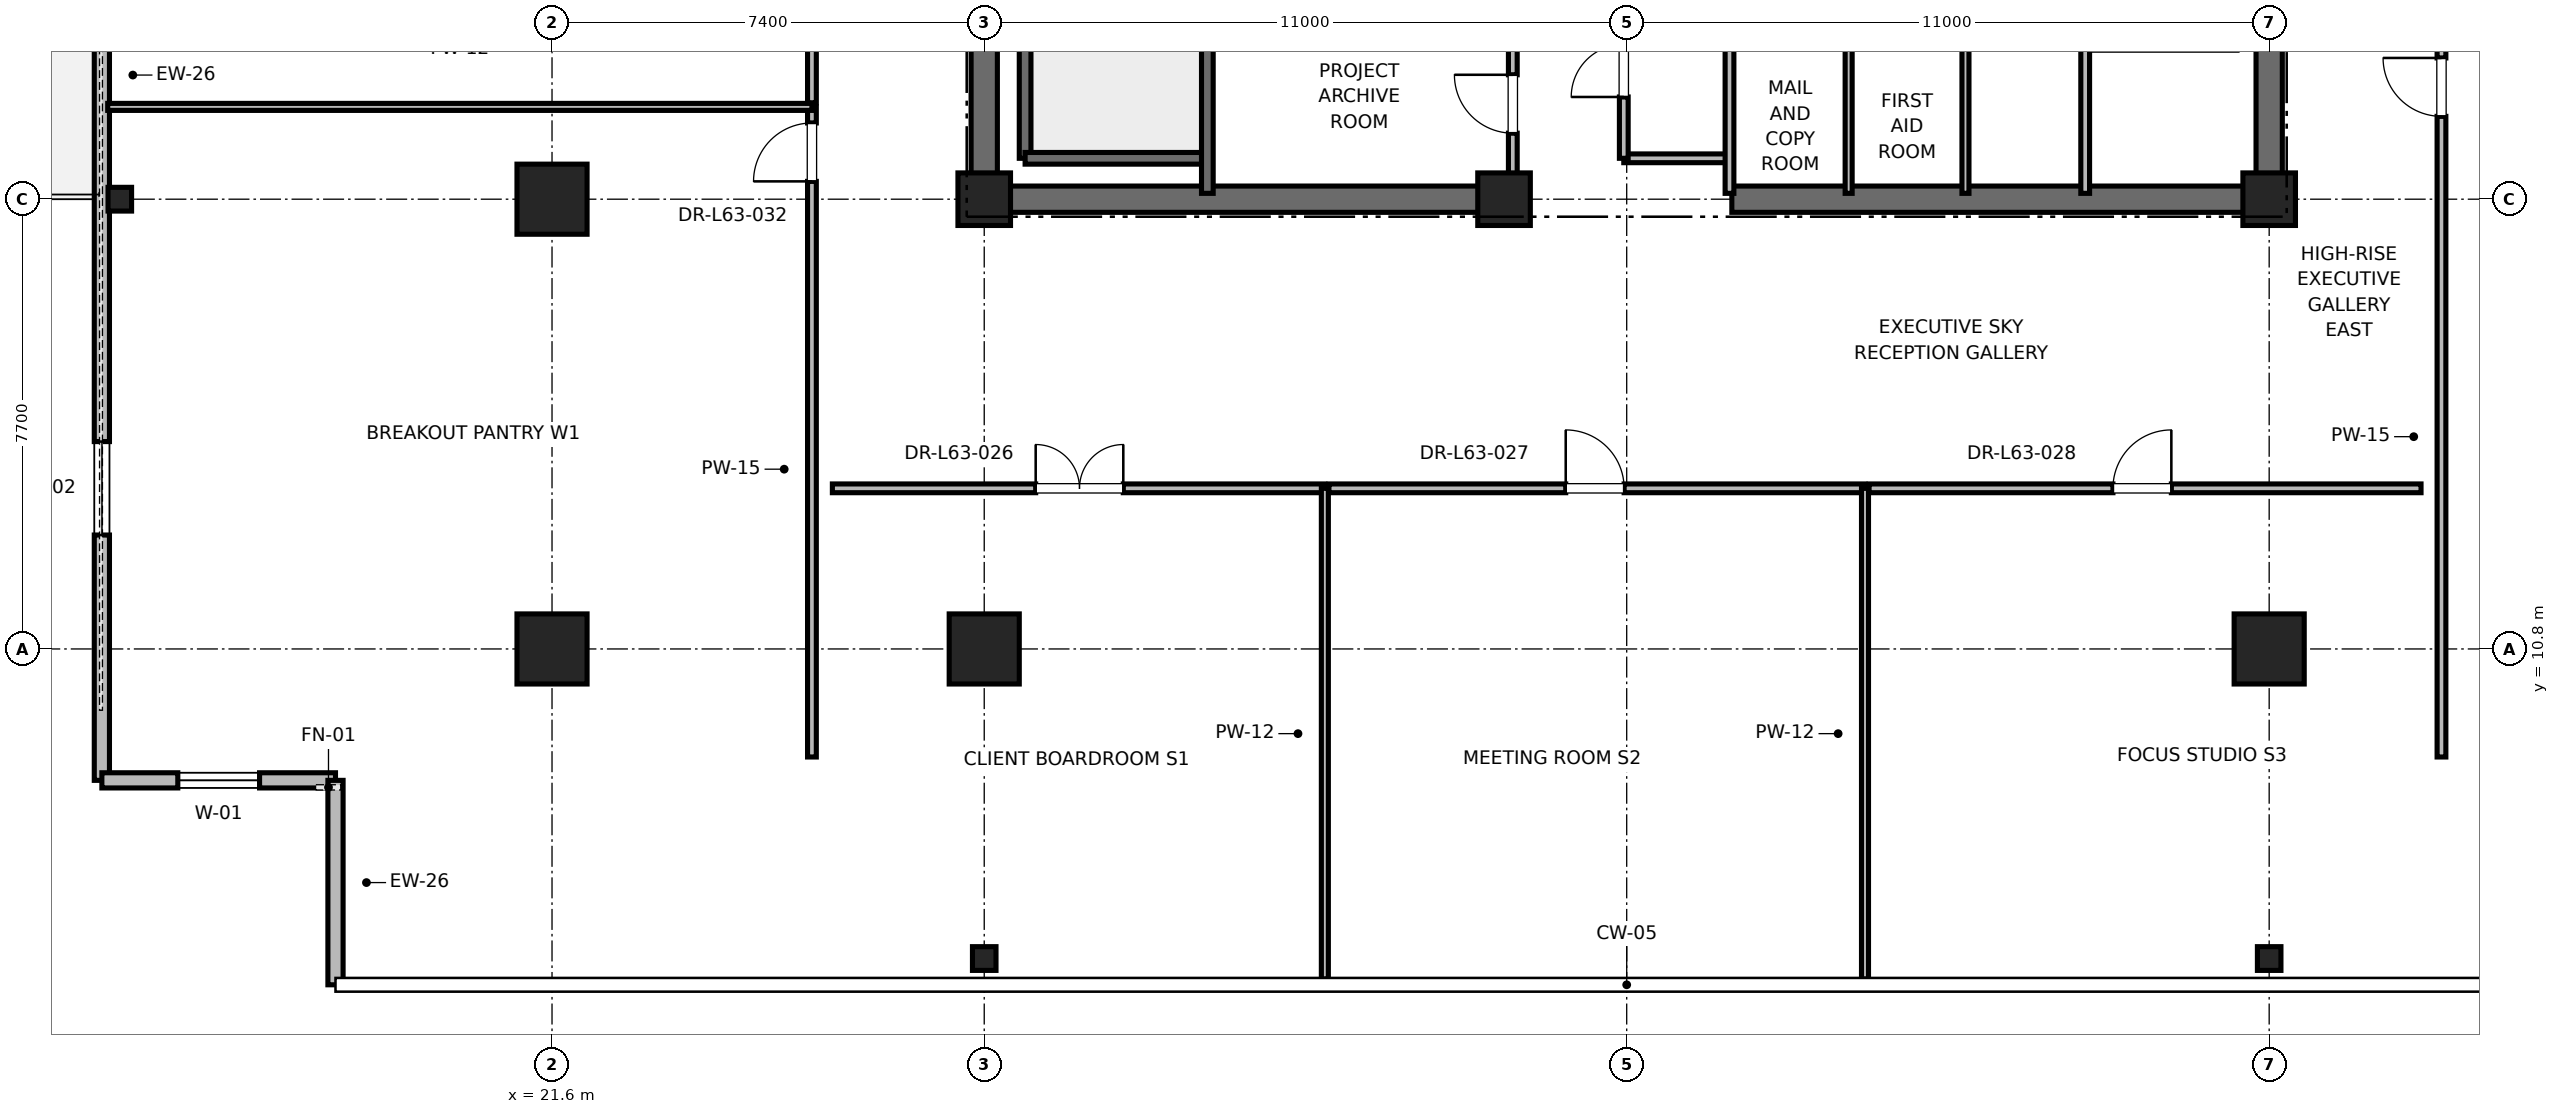
"""IFC4 building model, lengths in metres.
Left out: names, types, materials, properties, quantities, classifications, styles, units other than length and angle.
Written with IfcOpenShell. Run it as: python <this file> out.ifc"""

import sys

from ifc_helpers import new_model, si_unit, direction, frame, frame_2d, origin, origin_2d, place, context, subcontext, project, spatial, rectangle, i_section, extrude, element, fill, save


model = new_model("IFC4")
c1 = context("Model", 3, precision=1e-05, world=origin(), true_north=direction((0.0, 1.0)))
c2 = subcontext(c1, "Body", "Model", "MODEL_VIEW")
j1 = project(units=[si_unit("LENGTHUNIT", "METRE"), si_unit("PLANEANGLEUNIT", "RADIAN")], contexts=[c1])
p1 = place(None, origin())
s1 = spatial("IfcSite", under=j1, at=p1, CompositionType="ELEMENT")
p2 = place(p1, origin())
s2 = spatial("IfcBuilding", under=s1, at=p2, CompositionType="ELEMENT")
p3 = place(p2, frame((0.0, 0.0, 271.2)))
s3 = spatial("IfcBuildingStorey", under=s2, at=p3, CompositionType="ELEMENT", Elevation=271.2)
for number, where, z_axis, x_axis in (
    (1, (29.0, 10.8, 0.0), (0.0, 0.0, 1.0), (1.0, 0.0, 0.0)),
    (2, (51.0, 10.8, 0.0), (0.0, 0.0, 1.0), (1.0, 0.0, 0.0)),
    (3, (21.6, 18.5, 0.0), (0.0, 0.0, 1.0), (1.0, 0.0, 0.0)),
    (4, (21.6, 10.8, 0.0), (0.0, 0.0, 1.0), (1.0, 0.0, 0.0)),
):
    element("IfcColumn", number, at=place(p3, frame(where, z_axis=z_axis, x_axis=x_axis)), inside=s3, PredefinedType="COLUMN", context=c2, shape_type="SweptSolid", body=[
        extrude(rectangle(XDim=1.2, YDim=1.2, at=origin_2d()), origin(), (0.0, 0.0, 1.0), 4.0),
    ])
for number, where, z_axis, x_axis in (
    (5, (14.2, 18.5, 0.0), (0.0, 0.0, 1.0), (1.0, 0.0, 0.0)),
    (6, (29.0, 5.5, 0.0), (0.0, 0.0, 1.0), (1.0, 0.0, 0.0)),
    (7, (51.0, 5.5, 0.0), (0.0, 0.0, 1.0), (1.0, 0.0, 0.0)),
):
    element("IfcColumn", number, at=place(p3, frame(where, z_axis=z_axis, x_axis=x_axis)), inside=s3, PredefinedType="COLUMN", context=c2, shape_type="SweptSolid", body=[
        extrude(i_section(OverallWidth=0.403, OverallDepth=0.406, WebThickness=0.027, FlangeThickness=0.043, FilletRadius=0.015, at=origin_2d()), origin(), (0.0, 0.0, 1.0), 4.0),
    ])
for number, where, z_axis, x_axis in (
    (8, (29.0, 18.5, 0.0), (0.0, 0.0, 1.0), (1.0, 0.0, 0.0)),
    (9, (51.0, 18.5, 0.0), (0.0, 0.0, 1.0), (1.0, 0.0, 0.0)),
    (10, (37.9, 18.5, 0.0), (0.0, 0.0, 1.0), (1.0, 0.0, 0.0)),
):
    element("IfcColumn", number, at=place(p3, frame(where, z_axis=z_axis, x_axis=x_axis)), inside=s3, PredefinedType="PILASTER", context=c2, shape_type="SweptSolid", body=[
        extrude(rectangle(XDim=0.9, YDim=0.9, at=origin_2d()), origin(), (0.0, 0.0, 1.0), 4.0),
    ])
for number, where, z_axis, x_axis in (
    (11, (29.0, 18.5, 0.0), (0.0, 0.0, 1.0), (1.0, 0.0, 0.0)),
    (12, (41.8, 18.5, 0.0), (0.0, 0.0, 1.0), (1.0, 0.0, 0.0)),
):
    element("IfcWall", number, at=place(p3, frame(where, z_axis=z_axis, x_axis=x_axis)), inside=s3, PredefinedType="SHEAR", context=c2, shape_type="SweptSolid", body=[
        extrude(rectangle(XDim=9.2, YDim=0.45, at=frame_2d((4.6, 0.0))), origin(), (0.0, 0.0, 1.0), 3.785),
    ])
p4 = place(p3, frame((29.0, 18.5, 0.0), z_axis=(0.0, 0.0, 1.0), x_axis=(0.0, 1.0, 0.0)))
e13 = element("IfcWall", 13, at=p4, inside=s3, PredefinedType="SHEAR", context=c2, shape_type="SweptSolid", body=[
    extrude(rectangle(XDim=8.8, YDim=0.45, at=frame_2d((4.4, 0.0))), origin(), (0.0, 0.0, 1.0), 3.785),
])
p5 = place(p3, frame((51.0, 18.5, 0.0), z_axis=(0.0, 0.0, 1.0), x_axis=(0.0, 1.0, 0.0)))
e14 = element("IfcWall", 14, at=p5, inside=s3, PredefinedType="SHEAR", context=c2, shape_type="SweptSolid", body=[
    extrude(rectangle(XDim=5.8, YDim=0.45, at=frame_2d((2.9, 0.0))), origin(), (0.0, 0.0, 1.0), 3.785),
])
p6 = place(p3, frame((13.893, 46.45, 0.0), z_axis=(0.0, 0.0, 1.0), x_axis=(0.0, -1.0, 0.0)))
e15 = element("IfcWall", 15, at=p6, inside=s3, PredefinedType="PARAPET", context=c2, shape_type="SweptSolid", body=[
    extrude(rectangle(XDim=37.899, YDim=0.26, at=frame_2d((18.95, 0.0))), origin(), (0.0, 0.0, 1.0), 3.123),
])
p7 = place(p6, frame((4.2, 0.0, 0.85)))
e16 = element("IfcOpeningElement", 16, at=p7, cuts=e15, PredefinedType="OPENING", context=c2, shape_type="SweptSolid", body=[
    extrude(rectangle(XDim=1.6, YDim=2.1, at=frame_2d((0.8, 1.05))), frame((0.0, 0.13, 0.0), z_axis=(0.0, -1.0, 0.0), x_axis=(1.0, 0.0, 0.0)), (0.0, 0.0, 1.0), 0.26),
])
p8 = place(p6, frame((18.35, 0.0, 0.0)))
e17 = element("IfcOpeningElement", 17, at=p8, cuts=e15, PredefinedType="OPENING", context=c2, shape_type="SweptSolid", body=[
    extrude(rectangle(XDim=1.2, YDim=2.2, at=frame_2d((0.6, 1.1))), frame((0.0, 0.13, 0.0), z_axis=(0.0, -1.0, 0.0), x_axis=(1.0, 0.0, 0.0)), (0.0, 0.0, 1.0), 0.26),
])
p9 = place(p6, frame((32.099, 0.0, 0.85)))
e18 = element("IfcOpeningElement", 18, at=p9, cuts=e15, PredefinedType="OPENING", context=c2, shape_type="SweptSolid", body=[
    extrude(rectangle(XDim=1.6, YDim=2.1, at=frame_2d((0.8, 1.05))), frame((0.0, 0.13, 0.0), z_axis=(0.0, -1.0, 0.0), x_axis=(1.0, 0.0, 0.0)), (0.0, 0.0, 1.0), 0.26),
])
p10 = place(p3, frame((13.893, 8.55, 0.0), z_axis=(0.0, 0.0, 1.0), x_axis=(1.0, 0.0, 0.0)))
e19 = element("IfcWall", 19, at=p10, inside=s3, PredefinedType="PARAPET", context=c2, shape_type="SweptSolid", body=[
    extrude(rectangle(XDim=4.0, YDim=0.26, at=frame_2d((2.0, 0.0))), origin(), (0.0, 0.0, 1.0), 3.785),
])
p11 = place(p10, frame((1.3, 0.0, 0.85)))
e20 = element("IfcOpeningElement", 20, at=p11, cuts=e19, PredefinedType="OPENING", context=c2, shape_type="SweptSolid", body=[
    extrude(rectangle(XDim=1.4, YDim=2.0, at=frame_2d((0.7, 1.0))), frame((0.0, 0.13, 0.0), z_axis=(0.0, -1.0, 0.0), x_axis=(1.0, 0.0, 0.0)), (0.0, 0.0, 1.0), 0.26),
])
p12 = place(p3, frame((17.893, 8.55, 0.0), z_axis=(0.0, 0.0, 1.0), x_axis=(0.0, -1.0, 0.0)))
e21 = element("IfcWall", 21, at=p12, inside=s3, PredefinedType="PARAPET", context=c2, shape_type="SweptSolid", body=[
    extrude(rectangle(XDim=3.5, YDim=0.26, at=frame_2d((1.75, 0.0))), origin(), (0.0, 0.0, 1.0), 3.785),
])
p13 = place(p3, frame((29.7, 19.2, 0.0), z_axis=(0.0, 0.0, 1.0), x_axis=(0.0, 1.0, 0.0)))
e22 = element("IfcWall", 22, at=p13, inside=s3, PredefinedType="SOLIDWALL", context=c2, shape_type="SweptSolid", body=[
    extrude(rectangle(XDim=8.15, YDim=0.2, at=frame_2d((4.075, 0.0))), origin(), (0.0, 0.0, 1.0), 3.785),
])
p14 = place(p3, frame((29.7, 19.2, 0.0), z_axis=(0.0, 0.0, 1.0), x_axis=(1.0, 0.0, 0.0)))
e23 = element("IfcWall", 23, at=p14, inside=s3, PredefinedType="SOLIDWALL", context=c2, shape_type="SweptSolid", body=[
    extrude(rectangle(XDim=3.12, YDim=0.2, at=frame_2d((1.56, 0.0))), origin(), (0.0, 0.0, 1.0), 3.785),
])
p15 = place(p3, frame((32.82, 18.6, 0.0), z_axis=(0.0, 0.0, 1.0), x_axis=(0.0, 1.0, 0.0)))
e24 = element("IfcWall", 24, at=p15, inside=s3, PredefinedType="SOLIDWALL", context=c2, shape_type="SweptSolid", body=[
    extrude(rectangle(XDim=8.78, YDim=0.2, at=frame_2d((4.39, 0.0))), origin(), (0.0, 0.0, 1.0), 3.785),
])
p16 = place(p3, frame((39.95, 19.2, 0.0), z_axis=(0.0, 0.0, 1.0), x_axis=(1.0, 0.0, 0.0)))
e25 = element("IfcWall", 25, at=p16, inside=s3, PredefinedType="PARTITIONING", context=c2, shape_type="SweptSolid", body=[
    extrude(rectangle(XDim=1.81, YDim=0.15, at=frame_2d((0.905, 0.0))), origin(), (0.0, 0.0, 1.0), 2.85),
])
p17 = place(p3, frame((41.76, 18.6, 0.0), z_axis=(0.0, 0.0, 1.0), x_axis=(0.0, 1.0, 0.0)))
e26 = element("IfcWall", 26, at=p17, inside=s3, PredefinedType="PARTITIONING", context=c2, shape_type="SweptSolid", body=[
    extrude(rectangle(XDim=3.6, YDim=0.15, at=frame_2d((1.8, 0.0))), origin(), (0.0, 0.0, 1.0), 2.85),
])
p18 = place(p3, frame((39.95, 19.2, 0.0), z_axis=(0.0, 0.0, 1.0), x_axis=(0.0, 1.0, 0.0)))
e27 = element("IfcWall", 27, at=p18, inside=s3, PredefinedType="PARTITIONING", context=c2, shape_type="SweptSolid", body=[
    extrude(rectangle(XDim=3.0, YDim=0.15, at=frame_2d((1.5, 0.0))), origin(), (0.0, 0.0, 1.0), 2.85),
])
p19 = place(p18, frame((1.05, 0.0, 0.0)))
e28 = element("IfcOpeningElement", 28, at=p19, cuts=e27, PredefinedType="OPENING", context=c2, shape_type="SweptSolid", body=[
    extrude(rectangle(XDim=0.9, YDim=2.1, at=frame_2d((0.45, 1.05))), frame((0.0, 0.075, 0.0), z_axis=(0.0, -1.0, 0.0), x_axis=(1.0, 0.0, 0.0)), (0.0, 0.0, 1.0), 0.15),
])
p20 = place(p3, frame((38.05, 18.6, 0.0), z_axis=(0.0, 0.0, 1.0), x_axis=(0.0, 1.0, 0.0)))
e29 = element("IfcWall", 29, at=p20, inside=s3, PredefinedType="PARTITIONING", context=c2, shape_type="SweptSolid", body=[
    extrude(rectangle(XDim=3.06, YDim=0.15, at=frame_2d((1.53, 0.0))), origin(), (0.0, 0.0, 1.0), 2.85),
])
p21 = place(p20, frame((1.03, 0.0, 0.0)))
e30 = element("IfcOpeningElement", 30, at=p21, cuts=e29, PredefinedType="OPENING", context=c2, shape_type="SweptSolid", body=[
    extrude(rectangle(XDim=1.0, YDim=2.15, at=frame_2d((0.5, 1.075))), frame((0.0, 0.075, 0.0), z_axis=(0.0, -1.0, 0.0), x_axis=(1.0, 0.0, 0.0)), (0.0, 0.0, 1.0), 0.15),
])
p22 = place(p3, frame((47.85, 18.6, 0.0), z_axis=(0.0, 0.0, 1.0), x_axis=(0.0, 1.0, 0.0)))
e31 = element("IfcWall", 31, at=p22, inside=s3, PredefinedType="PARTITIONING", context=c2, shape_type="SweptSolid", body=[
    extrude(rectangle(XDim=2.54, YDim=0.15, at=frame_2d((1.27, 0.0))), origin(), (0.0, 0.0, 1.0), 2.85),
])
for number, where, z_axis, x_axis in (
    (32, (43.8, 18.6, 0.0), (0.0, 0.0, 1.0), (0.0, 1.0, 0.0)),
    (33, (45.8, 18.6, 0.0), (0.0, 0.0, 1.0), (0.0, 1.0, 0.0)),
):
    element("IfcWall", number, at=place(p3, frame(where, z_axis=z_axis, x_axis=x_axis)), inside=s3, PredefinedType="PARTITIONING", context=c2, shape_type="SweptSolid", body=[
        extrude(rectangle(XDim=3.02, YDim=0.12, at=frame_2d((1.51, 0.0))), origin(), (0.0, 0.0, 1.0), 2.85),
    ])
p23 = place(p3, frame((26.4, 13.55, 0.0), z_axis=(0.0, 0.0, 1.0), x_axis=(1.0, 0.0, 0.0)))
e34 = element("IfcWall", 34, at=p23, inside=s3, PredefinedType="PARTITIONING", context=c2, shape_type="SweptSolid", body=[
    extrude(rectangle(XDim=8.432, YDim=0.15, at=frame_2d((4.216, 0.0))), origin(), (0.0, 0.0, 1.0), 2.85),
])
p24 = place(p23, frame((3.481, 0.0, 0.0)))
e35 = element("IfcOpeningElement", 35, at=p24, cuts=e34, PredefinedType="OPENING", context=c2, shape_type="SweptSolid", body=[
    extrude(rectangle(XDim=1.5, YDim=2.25, at=frame_2d((0.75, 1.125))), frame((0.0, 0.075, 0.0), z_axis=(0.0, -1.0, 0.0), x_axis=(1.0, 0.0, 0.0)), (0.0, 0.0, 1.0), 0.15),
])
p25 = place(p3, frame((34.832, 5.15, 0.0), z_axis=(0.0, 0.0, 1.0), x_axis=(0.0, 1.0, 0.0)))
e36 = element("IfcWall", 36, at=p25, inside=s3, PredefinedType="PARTITIONING", context=c2, shape_type="SweptSolid", body=[
    extrude(rectangle(XDim=8.4, YDim=0.12, at=frame_2d((4.2, 0.0))), origin(), (0.0, 0.0, 1.0), 2.415),
])
p26 = place(p3, frame((34.902, 13.55, 0.0), z_axis=(0.0, 0.0, 1.0), x_axis=(1.0, 0.0, 0.0)))
e37 = element("IfcWall", 37, at=p26, inside=s3, PredefinedType="PARTITIONING", context=c2, shape_type="SweptSolid", body=[
    extrude(rectangle(XDim=9.178, YDim=0.15, at=frame_2d((4.589, 0.0))), origin(), (0.0, 0.0, 1.0), 2.85),
])
p27 = place(p26, frame((4.054, 0.0, 0.0)))
e38 = element("IfcOpeningElement", 38, at=p27, cuts=e37, PredefinedType="OPENING", context=c2, shape_type="SweptSolid", body=[
    extrude(rectangle(XDim=1.0, YDim=2.15, at=frame_2d((0.5, 1.075))), frame((0.0, 0.075, 0.0), z_axis=(0.0, -1.0, 0.0), x_axis=(1.0, 0.0, 0.0)), (0.0, 0.0, 1.0), 0.15),
])
p28 = place(p3, frame((44.08, 5.15, 0.0), z_axis=(0.0, 0.0, 1.0), x_axis=(0.0, 1.0, 0.0)))
e39 = element("IfcWall", 39, at=p28, inside=s3, PredefinedType="PARTITIONING", context=c2, shape_type="SweptSolid", body=[
    extrude(rectangle(XDim=8.4, YDim=0.12, at=frame_2d((4.2, 0.0))), origin(), (0.0, 0.0, 1.0), 2.415),
])
p29 = place(p3, frame((44.15, 13.55, 0.0), z_axis=(0.0, 0.0, 1.0), x_axis=(1.0, 0.0, 0.0)))
e40 = element("IfcWall", 40, at=p29, inside=s3, PredefinedType="PARTITIONING", context=c2, shape_type="SweptSolid", body=[
    extrude(rectangle(XDim=9.45, YDim=0.15, at=frame_2d((4.725, 0.0))), origin(), (0.0, 0.0, 1.0), 2.85),
])
p30 = place(p29, frame((4.175, 0.0, 0.0)))
e41 = element("IfcOpeningElement", 41, at=p30, cuts=e40, PredefinedType="OPENING", context=c2, shape_type="SweptSolid", body=[
    extrude(rectangle(XDim=1.0, YDim=2.15, at=frame_2d((0.5, 1.075))), frame((0.0, 0.075, 0.0), z_axis=(0.0, -1.0, 0.0), x_axis=(1.0, 0.0, 0.0)), (0.0, 0.0, 1.0), 0.15),
])
p31 = place(p3, frame((26.05, 8.95, 0.0), z_axis=(0.0, 0.0, 1.0), x_axis=(0.0, 1.0, 0.0)))
e42 = element("IfcWall", 42, at=p31, inside=s3, PredefinedType="PARTITIONING", context=c2, shape_type="SweptSolid", body=[
    extrude(rectangle(XDim=11.13, YDim=0.15, at=frame_2d((5.565, 0.0))), origin(), (0.0, 0.0, 1.0), 2.85),
])
p32 = place(p31, frame((9.855, 0.0, 0.0)))
e43 = element("IfcOpeningElement", 43, at=p32, cuts=e42, PredefinedType="OPENING", context=c2, shape_type="SweptSolid", body=[
    extrude(rectangle(XDim=1.0, YDim=2.15, at=frame_2d((0.5, 1.075))), frame((0.0, 0.075, 0.0), z_axis=(0.0, -1.0, 0.0), x_axis=(1.0, 0.0, 0.0)), (0.0, 0.0, 1.0), 0.15),
])
p33 = place(p3, frame((13.993, 20.08, 0.0), z_axis=(0.0, 0.0, 1.0), x_axis=(1.0, 0.0, 0.0)))
e44 = element("IfcWall", 44, at=p33, inside=s3, PredefinedType="PARTITIONING", context=c2, shape_type="SweptSolid", body=[
    extrude(rectangle(XDim=12.057, YDim=0.12, at=frame_2d((6.029, 0.0))), origin(), (0.0, 0.0, 1.0), 2.85),
])
p34 = place(p3, frame((26.05, 20.15, 0.0), z_axis=(0.0, 0.0, 1.0), x_axis=(0.0, 1.0, 0.0)))
e45 = element("IfcWall", 45, at=p34, inside=s3, PredefinedType="PARTITIONING", context=c2, shape_type="SweptSolid", body=[
    extrude(rectangle(XDim=13.286, YDim=0.15, at=frame_2d((6.643, 0.0))), origin(), (0.0, 0.0, 1.0), 2.85),
])
p35 = place(p34, frame((6.108, 0.0, 0.0)))
e46 = element("IfcOpeningElement", 46, at=p35, cuts=e45, PredefinedType="OPENING", context=c2, shape_type="SweptSolid", body=[
    extrude(rectangle(XDim=1.0, YDim=2.15, at=frame_2d((0.5, 1.075))), frame((0.0, 0.075, 0.0), z_axis=(0.0, -1.0, 0.0), x_axis=(1.0, 0.0, 0.0)), (0.0, 0.0, 1.0), 0.15),
])
p36 = place(p3, frame((53.95, 8.95, 0.0), z_axis=(0.0, 0.0, 1.0), x_axis=(0.0, 1.0, 0.0)))
e47 = element("IfcWall", 47, at=p36, inside=s3, PredefinedType="PARTITIONING", context=c2, shape_type="SweptSolid", body=[
    extrude(rectangle(XDim=13.356, YDim=0.15, at=frame_2d((6.678, 0.0))), origin(), (0.0, 0.0, 1.0), 2.85),
])
p37 = place(p36, frame((10.968, 0.0, 0.0)))
e48 = element("IfcOpeningElement", 48, at=p37, cuts=e47, PredefinedType="OPENING", context=c2, shape_type="SweptSolid", body=[
    extrude(rectangle(XDim=1.0, YDim=2.15, at=frame_2d((0.5, 1.075))), frame((0.0, 0.075, 0.0), z_axis=(0.0, -1.0, 0.0), x_axis=(1.0, 0.0, 0.0)), (0.0, 0.0, 1.0), 0.15),
])
p38 = place(p9, origin())
e49 = element("IfcWindow", 49, at=p38, inside=s3, PartitioningType="SINGLE_PANEL", PredefinedType="WINDOW", context=c2, shape_type="SweptSolid", body=[
    extrude(rectangle(XDim=1.6, YDim=2.1, at=frame_2d((0.8, 1.05))), frame((0.0, 0.03, 0.0), z_axis=(0.0, -1.0, 0.0), x_axis=(1.0, 0.0, 0.0)), (0.0, 0.0, 1.0), 0.06),
])
fill(e18, e49)
p39 = place(p11, origin())
e50 = element("IfcWindow", 50, at=p39, inside=s3, PartitioningType="SINGLE_PANEL", PredefinedType="WINDOW", context=c2, shape_type="SweptSolid", body=[
    extrude(rectangle(XDim=1.4, YDim=2.0, at=frame_2d((0.7, 1.0))), frame((0.0, 0.03, 0.0), z_axis=(0.0, -1.0, 0.0), x_axis=(1.0, 0.0, 0.0)), (0.0, 0.0, 1.0), 0.06),
])
fill(e20, e50)
p40 = place(p19, origin())
e51 = element("IfcDoor", 51, at=p40, inside=s3, OperationType="SINGLE_SWING_LEFT", PredefinedType="DOOR", context=c2, shape_type="SweptSolid", body=[
    extrude(rectangle(XDim=0.9, YDim=2.1, at=frame_2d((0.45, 1.05))), frame((0.0, 0.025, 0.0), z_axis=(0.0, -1.0, 0.0), x_axis=(1.0, 0.0, 0.0)), (0.0, 0.0, 1.0), 0.05),
])
fill(e28, e51)
p41 = place(p21, origin())
e52 = element("IfcDoor", 52, at=p41, inside=s3, OperationType="SINGLE_SWING_RIGHT", PredefinedType="DOOR", context=c2, shape_type="SweptSolid", body=[
    extrude(rectangle(XDim=1.0, YDim=2.15, at=frame_2d((0.5, 1.075))), frame((0.0, 0.025, 0.0), z_axis=(0.0, -1.0, 0.0), x_axis=(1.0, 0.0, 0.0)), (0.0, 0.0, 1.0), 0.05),
])
fill(e30, e52)
p42 = place(p24, origin())
e53 = element("IfcDoor", 53, at=p42, inside=s3, OperationType="DOUBLE_DOOR_SINGLE_SWING", PredefinedType="DOOR", context=c2, shape_type="SweptSolid", body=[
    extrude(rectangle(XDim=1.5, YDim=2.25, at=frame_2d((0.75, 1.125))), frame((0.0, 0.025, 0.0), z_axis=(0.0, -1.0, 0.0), x_axis=(1.0, 0.0, 0.0)), (0.0, 0.0, 1.0), 0.05),
])
fill(e35, e53)
p43 = place(p27, origin())
e54 = element("IfcDoor", 54, at=p43, inside=s3, OperationType="SINGLE_SWING_LEFT", PredefinedType="DOOR", context=c2, shape_type="SweptSolid", body=[
    extrude(rectangle(XDim=1.0, YDim=2.15, at=frame_2d((0.5, 1.075))), frame((0.0, 0.025, 0.0), z_axis=(0.0, -1.0, 0.0), x_axis=(1.0, 0.0, 0.0)), (0.0, 0.0, 1.0), 0.05),
])
fill(e38, e54)
p44 = place(p30, origin())
e55 = element("IfcDoor", 55, at=p44, inside=s3, OperationType="SINGLE_SWING_RIGHT", PredefinedType="DOOR", context=c2, shape_type="SweptSolid", body=[
    extrude(rectangle(XDim=1.0, YDim=2.15, at=frame_2d((0.5, 1.075))), frame((0.0, 0.025, 0.0), z_axis=(0.0, -1.0, 0.0), x_axis=(1.0, 0.0, 0.0)), (0.0, 0.0, 1.0), 0.05),
])
fill(e41, e55)
p45 = place(p32, origin())
e56 = element("IfcDoor", 56, at=p45, inside=s3, OperationType="SINGLE_SWING_LEFT", PredefinedType="DOOR", context=c2, shape_type="SweptSolid", body=[
    extrude(rectangle(XDim=1.0, YDim=2.15, at=frame_2d((0.5, 1.075))), frame((0.0, 0.025, 0.0), z_axis=(0.0, -1.0, 0.0), x_axis=(1.0, 0.0, 0.0)), (0.0, 0.0, 1.0), 0.05),
])
fill(e43, e56)
p46 = place(p37, origin())
e57 = element("IfcDoor", 57, at=p46, inside=s3, OperationType="SINGLE_SWING_RIGHT", PredefinedType="DOOR", context=c2, shape_type="SweptSolid", body=[
    extrude(rectangle(XDim=1.0, YDim=2.15, at=frame_2d((0.5, 1.075))), frame((0.0, 0.025, 0.0), z_axis=(0.0, -1.0, 0.0), x_axis=(1.0, 0.0, 0.0)), (0.0, 0.0, 1.0), 0.05),
])
fill(e48, e57)
save(model, sys.argv[1])
